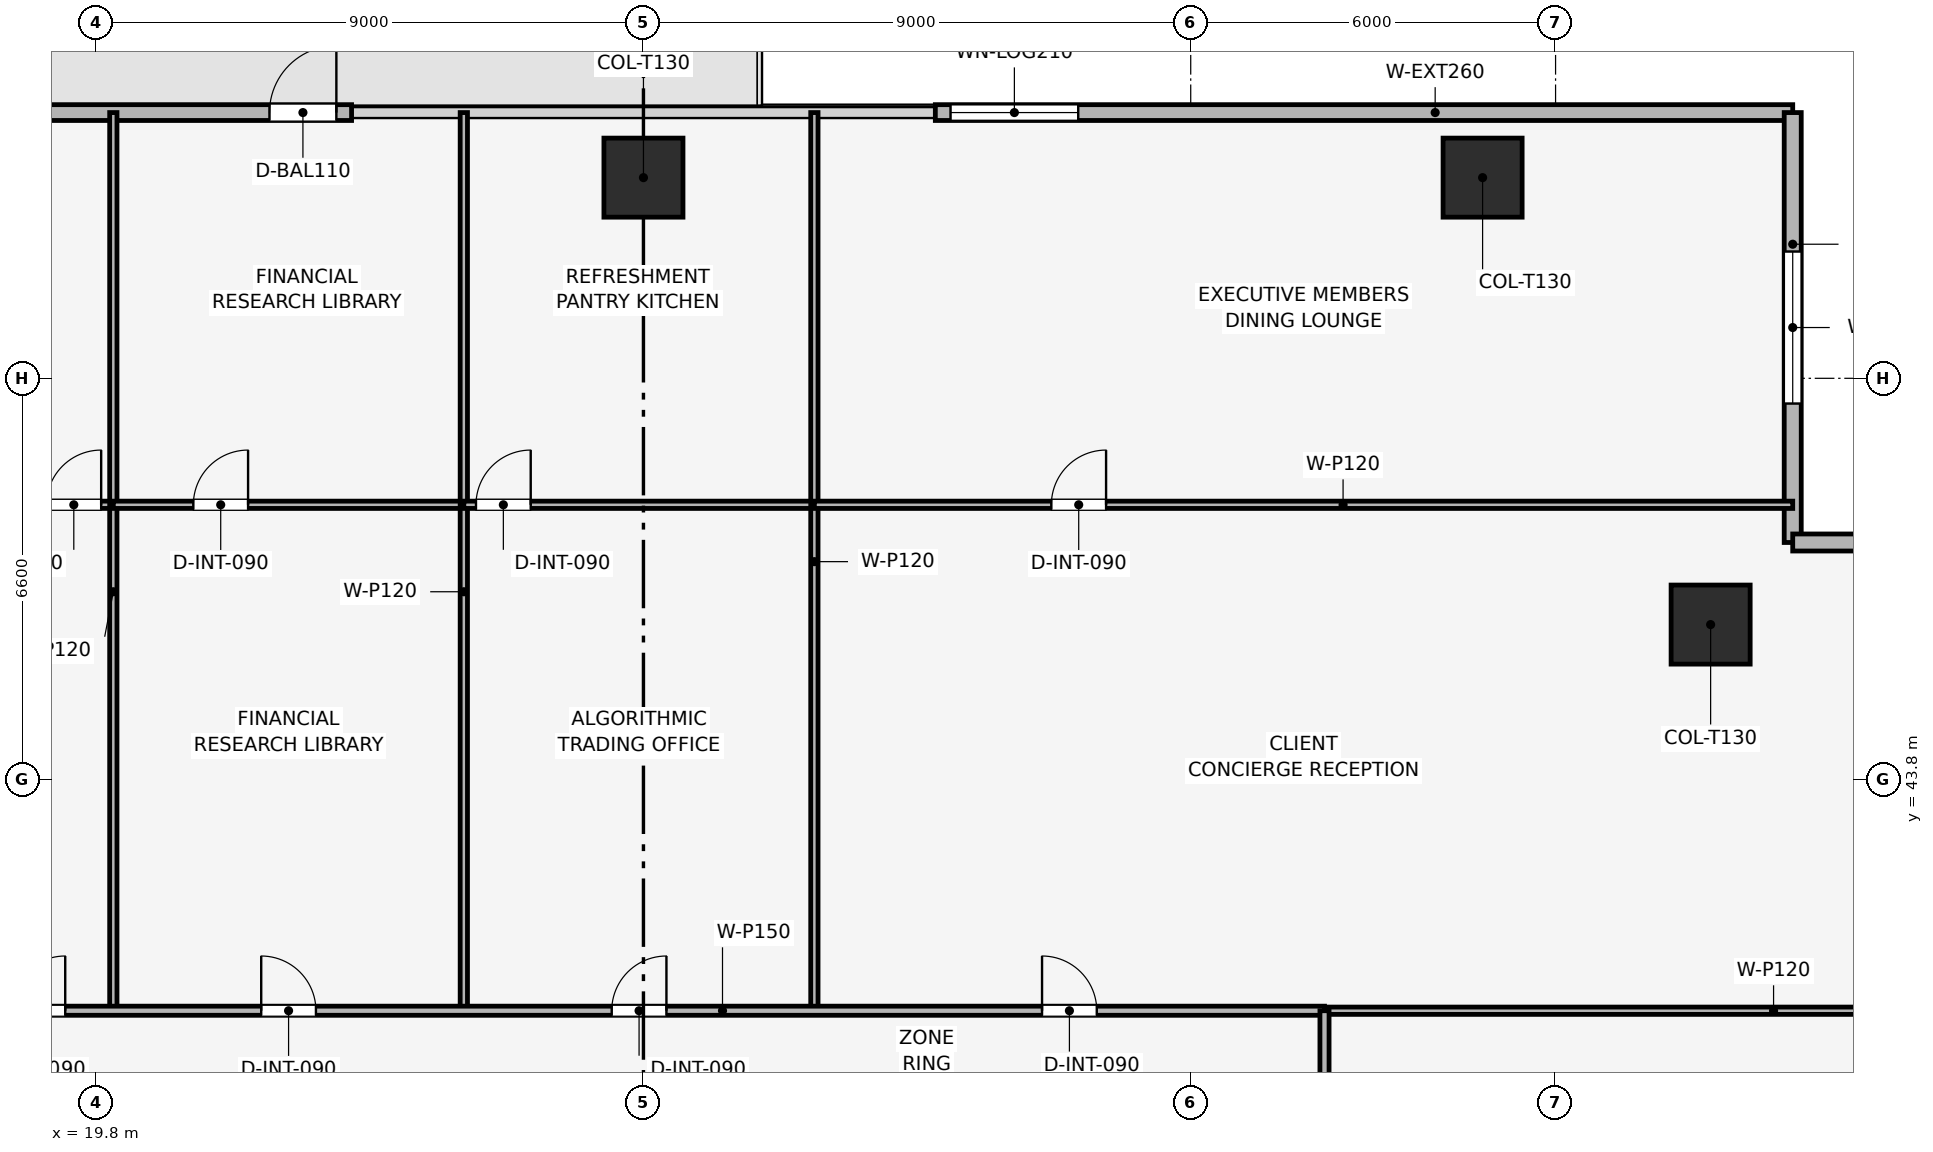
"""IFC4 building model, lengths in metres.
Left out: names, types, materials, properties, quantities, classifications, styles, units other than length and angle.
Written with IfcOpenShell. Run it as: python <this file> out.ifc"""

import sys

from ifc_helpers import new_model, si_unit, direction, frame, frame_2d, origin, origin_2d, place, context, subcontext, project, spatial, rectangle, extrude, element, fill, save


model = new_model("IFC4")
c1 = context("Model", 3, precision=1e-05, world=origin(), true_north=direction((0.0, 1.0)))
c2 = subcontext(c1, "Body", "Model", "MODEL_VIEW")
j1 = project(units=[si_unit("LENGTHUNIT", "METRE"), si_unit("PLANEANGLEUNIT", "RADIAN")], contexts=[c1])
p1 = place(None, origin())
s1 = spatial("IfcSite", under=j1, at=p1, CompositionType="ELEMENT")
p2 = place(p1, origin())
s2 = spatial("IfcBuilding", under=s1, at=p2, CompositionType="ELEMENT")
p3 = place(p2, frame((0.0, 0.0, 129.0)))
s3 = spatial("IfcBuildingStorey", under=s2, at=p3, CompositionType="ELEMENT", Elevation=129.0)
for number, where, z_axis, x_axis in (
    (1, (42.6, 53.7, 0.003), (0.0, 0.0, 1.0), (1.0, 0.0, 0.0)),
    (2, (28.8, 53.7, 0.003), (0.0, 0.0, 1.0), (1.0, 0.0, 0.0)),
    (3, (46.35, 46.35, 0.003), (0.0, 0.0, 1.0), (1.0, 0.0, 0.0)),
):
    element("IfcColumn", number, at=place(p3, frame(where, z_axis=z_axis, x_axis=x_axis)), inside=s3, PredefinedType="COLUMN", context=c2, shape_type="SweptSolid", body=[
        extrude(rectangle(XDim=1.3, YDim=1.3, at=origin_2d()), origin(), (0.0, 0.0, 1.0), 3.644),
    ])
p4 = place(p3, frame((9.9, 54.77, 0.0), z_axis=(0.0, 0.0, 1.0), x_axis=(1.0, 0.0, 0.0)))
e4 = element("IfcWall", 4, at=p4, inside=s3, PredefinedType="SOLIDWALL", context=c2, shape_type="SweptSolid", body=[
    extrude(rectangle(XDim=14.1, YDim=0.26, at=frame_2d((7.05, 0.0))), origin(), (0.0, 0.0, 1.0), 3.65),
])
p5 = place(p4, frame((12.75, 0.0, 0.0)))
e5 = element("IfcOpeningElement", 5, at=p5, cuts=e4, PredefinedType="OPENING", context=c2, shape_type="SweptSolid", body=[
    extrude(rectangle(XDim=1.1, YDim=2.2, at=frame_2d((0.55, 1.1))), frame((0.0, 0.14, 0.0), z_axis=(0.0, -1.0, 0.0), x_axis=(1.0, 0.0, 0.0)), (0.0, 0.0, 1.0), 0.28),
])
p6 = place(p3, frame((33.6, 54.77, 0.0), z_axis=(0.0, 0.0, 1.0), x_axis=(1.0, 0.0, 0.0)))
e6 = element("IfcWall", 6, at=p6, inside=s3, PredefinedType="SOLIDWALL", context=c2, shape_type="SweptSolid", body=[
    extrude(rectangle(XDim=14.1, YDim=0.26, at=frame_2d((7.05, 0.0))), origin(), (0.0, 0.0, 1.0), 3.65),
])
p7 = place(p6, frame((0.25, 0.0, 0.72)))
e7 = element("IfcOpeningElement", 7, at=p7, cuts=e6, PredefinedType="OPENING", context=c2, shape_type="SweptSolid", body=[
    extrude(rectangle(XDim=2.1, YDim=2.1, at=frame_2d((1.05, 1.05))), frame((0.0, 0.14, 0.0), z_axis=(0.0, -1.0, 0.0), x_axis=(1.0, 0.0, 0.0)), (0.0, 0.0, 1.0), 0.28),
])
p8 = place(p3, frame((47.7, 54.77, 0.0), z_axis=(0.0, 0.0, 1.0), x_axis=(0.0, -1.0, 0.0)))
e8 = element("IfcWall", 8, at=p8, inside=s3, PredefinedType="SOLIDWALL", context=c2, shape_type="SweptSolid", body=[
    extrude(rectangle(XDim=7.07, YDim=0.28, at=frame_2d((3.535, 0.0))), origin(), (0.0, 0.0, 1.0), 3.65),
])
p9 = place(p8, frame((2.285, 0.0, 0.72)))
e9 = element("IfcOpeningElement", 9, at=p9, cuts=e8, PredefinedType="OPENING", context=c2, shape_type="SweptSolid", body=[
    extrude(rectangle(XDim=2.5, YDim=1.9, at=frame_2d((1.25, 0.95))), frame((0.0, 0.15, 0.0), z_axis=(0.0, -1.0, 0.0), x_axis=(1.0, 0.0, 0.0)), (0.0, 0.0, 1.0), 0.3),
])
p10 = place(p3, frame((47.7, 47.7, 0.0), z_axis=(0.0, 0.0, 1.0), x_axis=(1.0, 0.0, 0.0)))
e10 = element("IfcWall", 10, at=p10, inside=s3, PredefinedType="SOLIDWALL", context=c2, shape_type="SweptSolid", body=[
    extrude(rectangle(XDim=7.07, YDim=0.28, at=frame_2d((3.535, 0.0))), origin(), (0.0, 0.0, 1.0), 3.65),
])
p11 = place(p10, frame((2.285, 0.0, 0.72)))
e11 = element("IfcOpeningElement", 11, at=p11, cuts=e10, PredefinedType="OPENING", context=c2, shape_type="SweptSolid", body=[
    extrude(rectangle(XDim=2.5, YDim=1.9, at=frame_2d((1.25, 0.95))), frame((0.0, 0.15, 0.0), z_axis=(0.0, -1.0, 0.0), x_axis=(1.0, 0.0, 0.0)), (0.0, 0.0, 1.0), 0.3),
])
p12 = place(p3, frame((9.9, 48.32, 0.0), z_axis=(0.0, 0.0, 1.0), x_axis=(1.0, 0.0, 0.0)))
e12 = element("IfcWall", 12, at=p12, inside=s3, PredefinedType="PARTITIONING", context=c2, shape_type="SweptSolid", body=[
    extrude(rectangle(XDim=10.182, YDim=0.12, at=frame_2d((5.091, 0.0))), origin(), (0.0, 0.0, 1.0), 2.835),
])
p13 = place(p12, frame((9.082, 0.0, 0.0)))
e13 = element("IfcOpeningElement", 13, at=p13, cuts=e12, PredefinedType="OPENING", context=c2, shape_type="SweptSolid", body=[
    extrude(rectangle(XDim=0.9, YDim=2.1, at=frame_2d((0.45, 1.05))), frame((0.0, 0.07, 0.0), z_axis=(0.0, -1.0, 0.0), x_axis=(1.0, 0.0, 0.0)), (0.0, 0.0, 1.0), 0.14),
])
p14 = place(p3, frame((20.082, 40.0, 0.0), z_axis=(0.0, 0.0, 1.0), x_axis=(0.0, 1.0, 0.0)))
e14 = element("IfcWall", 14, at=p14, inside=s3, PredefinedType="PARTITIONING", context=c2, shape_type="SweptSolid", body=[
    extrude(rectangle(XDim=14.77, YDim=0.12, at=frame_2d((7.385, 0.0))), origin(), (0.0, 0.0, 1.0), 2.835),
])
p15 = place(p3, frame((20.082, 48.32, 0.0), z_axis=(0.0, 0.0, 1.0), x_axis=(1.0, 0.0, 0.0)))
e15 = element("IfcWall", 15, at=p15, inside=s3, PredefinedType="PARTITIONING", context=c2, shape_type="SweptSolid", body=[
    extrude(rectangle(XDim=5.764, YDim=0.12, at=frame_2d((2.882, 0.0))), origin(), (0.0, 0.0, 1.0), 3.185),
])
p16 = place(p15, frame((1.316, 0.0, 0.0)))
e16 = element("IfcOpeningElement", 16, at=p16, cuts=e15, PredefinedType="OPENING", context=c2, shape_type="SweptSolid", body=[
    extrude(rectangle(XDim=0.9, YDim=2.1, at=frame_2d((0.45, 1.05))), frame((0.0, 0.07, 0.0), z_axis=(0.0, -1.0, 0.0), x_axis=(1.0, 0.0, 0.0)), (0.0, 0.0, 1.0), 0.14),
])
p17 = place(p3, frame((25.846, 40.0, 0.0), z_axis=(0.0, 0.0, 1.0), x_axis=(0.0, 1.0, 0.0)))
e17 = element("IfcWall", 17, at=p17, inside=s3, PredefinedType="PARTITIONING", context=c2, shape_type="SweptSolid", body=[
    extrude(rectangle(XDim=14.77, YDim=0.12, at=frame_2d((7.385, 0.0))), origin(), (0.0, 0.0, 1.0), 2.835),
])
p18 = place(p3, frame((25.846, 48.32, 0.0), z_axis=(0.0, 0.0, 1.0), x_axis=(1.0, 0.0, 0.0)))
e18 = element("IfcWall", 18, at=p18, inside=s3, PredefinedType="PARTITIONING", context=c2, shape_type="SweptSolid", body=[
    extrude(rectangle(XDim=5.765, YDim=0.12, at=frame_2d((2.883, 0.0))), origin(), (0.0, 0.0, 1.0), 3.185),
])
p19 = place(p18, frame((0.2, 0.0, 0.0)))
e19 = element("IfcOpeningElement", 19, at=p19, cuts=e18, PredefinedType="OPENING", context=c2, shape_type="SweptSolid", body=[
    extrude(rectangle(XDim=0.9, YDim=2.1, at=frame_2d((0.45, 1.05))), frame((0.0, 0.07, 0.0), z_axis=(0.0, -1.0, 0.0), x_axis=(1.0, 0.0, 0.0)), (0.0, 0.0, 1.0), 0.14),
])
p20 = place(p3, frame((31.611, 40.0, 0.0), z_axis=(0.0, 0.0, 1.0), x_axis=(0.0, 1.0, 0.0)))
e20 = element("IfcWall", 20, at=p20, inside=s3, PredefinedType="PARTITIONING", context=c2, shape_type="SweptSolid", body=[
    extrude(rectangle(XDim=14.77, YDim=0.12, at=frame_2d((7.385, 0.0))), origin(), (0.0, 0.0, 1.0), 2.835),
])
p21 = place(p3, frame((31.611, 48.32, 0.0), z_axis=(0.0, 0.0, 1.0), x_axis=(1.0, 0.0, 0.0)))
e21 = element("IfcWall", 21, at=p21, inside=s3, PredefinedType="PARTITIONING", context=c2, shape_type="SweptSolid", body=[
    extrude(rectangle(XDim=16.089, YDim=0.12, at=frame_2d((8.044, 0.0))), origin(), (0.0, 0.0, 1.0), 2.835),
])
p22 = place(p21, frame((3.897, 0.0, 0.0)))
e22 = element("IfcOpeningElement", 22, at=p22, cuts=e21, PredefinedType="OPENING", context=c2, shape_type="SweptSolid", body=[
    extrude(rectangle(XDim=0.9, YDim=2.1, at=frame_2d((0.45, 1.05))), frame((0.0, 0.07, 0.0), z_axis=(0.0, -1.0, 0.0), x_axis=(1.0, 0.0, 0.0)), (0.0, 0.0, 1.0), 0.14),
])
p23 = place(p3, frame((40.0, 40.0, 0.0), z_axis=(0.0, 0.0, 1.0), x_axis=(1.0, 0.0, 0.0)))
e23 = element("IfcWall", 23, at=p23, inside=s3, PredefinedType="PARTITIONING", context=c2, shape_type="SweptSolid", body=[
    extrude(rectangle(XDim=14.77, YDim=0.12, at=frame_2d((7.385, 0.0))), origin(), (0.0, 0.0, 1.0), 2.835),
])
p24 = place(p3, frame((17.6, 40.0, 0.0), z_axis=(0.0, 0.0, 1.0), x_axis=(1.0, 0.0, 0.0)))
e24 = element("IfcWall", 24, at=p24, inside=s3, PredefinedType="PARTITIONING", context=c2, shape_type="SweptSolid", body=[
    extrude(rectangle(XDim=22.4, YDim=0.15, at=frame_2d((11.2, 0.0))), origin(), (0.0, 0.0, 1.0), 3.185),
])
p25 = place(p24, frame((0.791, 0.0, 0.0)))
e25 = element("IfcOpeningElement", 25, at=p25, cuts=e24, PredefinedType="OPENING", context=c2, shape_type="SweptSolid", body=[
    extrude(rectangle(XDim=0.9, YDim=2.1, at=frame_2d((0.45, 1.05))), frame((0.0, 0.085, 0.0), z_axis=(0.0, -1.0, 0.0), x_axis=(1.0, 0.0, 0.0)), (0.0, 0.0, 1.0), 0.17),
])
p26 = place(p24, frame((4.914, 0.0, 0.0)))
e26 = element("IfcOpeningElement", 26, at=p26, cuts=e24, PredefinedType="OPENING", context=c2, shape_type="SweptSolid", body=[
    extrude(rectangle(XDim=0.9, YDim=2.1, at=frame_2d((0.45, 1.05))), frame((0.0, 0.085, 0.0), z_axis=(0.0, -1.0, 0.0), x_axis=(1.0, 0.0, 0.0)), (0.0, 0.0, 1.0), 0.17),
])
p27 = place(p24, frame((10.678, 0.0, 0.0)))
e27 = element("IfcOpeningElement", 27, at=p27, cuts=e24, PredefinedType="OPENING", context=c2, shape_type="SweptSolid", body=[
    extrude(rectangle(XDim=0.9, YDim=2.1, at=frame_2d((0.45, 1.05))), frame((0.0, 0.085, 0.0), z_axis=(0.0, -1.0, 0.0), x_axis=(1.0, 0.0, 0.0)), (0.0, 0.0, 1.0), 0.17),
])
p28 = place(p24, frame((17.755, 0.0, 0.0)))
e28 = element("IfcOpeningElement", 28, at=p28, cuts=e24, PredefinedType="OPENING", context=c2, shape_type="SweptSolid", body=[
    extrude(rectangle(XDim=0.9, YDim=2.1, at=frame_2d((0.45, 1.05))), frame((0.0, 0.085, 0.0), z_axis=(0.0, -1.0, 0.0), x_axis=(1.0, 0.0, 0.0)), (0.0, 0.0, 1.0), 0.17),
])
p29 = place(p3, frame((40.0, 17.6, 0.0), z_axis=(0.0, 0.0, 1.0), x_axis=(0.0, 1.0, 0.0)))
e29 = element("IfcWall", 29, at=p29, inside=s3, PredefinedType="PARTITIONING", context=c2, shape_type="SweptSolid", body=[
    extrude(rectangle(XDim=22.4, YDim=0.15, at=frame_2d((11.2, 0.0))), origin(), (0.0, 0.0, 1.0), 3.185),
])
p30 = place(p29, frame((1.95, 0.0, 0.0)))
e30 = element("IfcOpeningElement", 30, at=p30, cuts=e29, PredefinedType="OPENING", context=c2, shape_type="SweptSolid", body=[
    extrude(rectangle(XDim=0.9, YDim=2.1, at=frame_2d((0.45, 1.05))), frame((0.0, 0.085, 0.0), z_axis=(0.0, -1.0, 0.0), x_axis=(1.0, 0.0, 0.0)), (0.0, 0.0, 1.0), 0.17),
])
p31 = place(p29, frame((5.75, 0.0, 0.0)))
e31 = element("IfcOpeningElement", 31, at=p31, cuts=e29, PredefinedType="OPENING", context=c2, shape_type="SweptSolid", body=[
    extrude(rectangle(XDim=0.9, YDim=2.1, at=frame_2d((0.45, 1.05))), frame((0.0, 0.085, 0.0), z_axis=(0.0, -1.0, 0.0), x_axis=(1.0, 0.0, 0.0)), (0.0, 0.0, 1.0), 0.17),
])
p32 = place(p29, frame((8.65, 0.0, 0.0)))
e32 = element("IfcOpeningElement", 32, at=p32, cuts=e29, PredefinedType="OPENING", context=c2, shape_type="SweptSolid", body=[
    extrude(rectangle(XDim=0.9, YDim=2.1, at=frame_2d((0.45, 1.05))), frame((0.0, 0.085, 0.0), z_axis=(0.0, -1.0, 0.0), x_axis=(1.0, 0.0, 0.0)), (0.0, 0.0, 1.0), 0.17),
])
p33 = place(p29, frame((11.4, 0.0, 0.0)))
e33 = element("IfcOpeningElement", 33, at=p33, cuts=e29, PredefinedType="OPENING", context=c2, shape_type="SweptSolid", body=[
    extrude(rectangle(XDim=0.95, YDim=2.1, at=frame_2d((0.475, 1.05))), frame((0.0, 0.085, 0.0), z_axis=(0.0, -1.0, 0.0), x_axis=(1.0, 0.0, 0.0)), (0.0, 0.0, 1.0), 0.17),
])
p34 = place(p29, frame((17.35, 0.0, 0.0)))
e34 = element("IfcOpeningElement", 34, at=p34, cuts=e29, PredefinedType="OPENING", context=c2, shape_type="SweptSolid", body=[
    extrude(rectangle(XDim=0.9, YDim=2.1, at=frame_2d((0.45, 1.05))), frame((0.0, 0.085, 0.0), z_axis=(0.0, -1.0, 0.0), x_axis=(1.0, 0.0, 0.0)), (0.0, 0.0, 1.0), 0.17),
])
p35 = place(p5, origin())
e35 = element("IfcDoor", 35, at=p35, inside=s3, OperationType="SINGLE_SWING_RIGHT", PredefinedType="DOOR", context=c2, shape_type="SweptSolid", body=[
    extrude(rectangle(XDim=1.1, YDim=2.2, at=frame_2d((0.55, 1.1))), frame((0.0, 0.025, 0.0), z_axis=(0.0, -1.0, 0.0), x_axis=(1.0, 0.0, 0.0)), (0.0, 0.0, 1.0), 0.05),
])
fill(e5, e35)
p36 = place(p7, origin())
e36 = element("IfcWindow", 36, at=p36, inside=s3, PartitioningType="SINGLE_PANEL", PredefinedType="WINDOW", context=c2, shape_type="SweptSolid", body=[
    extrude(rectangle(XDim=2.1, YDim=2.1, at=frame_2d((1.05, 1.05))), frame((0.0, 0.03, 0.0), z_axis=(0.0, -1.0, 0.0), x_axis=(1.0, 0.0, 0.0)), (0.0, 0.0, 1.0), 0.06),
])
fill(e7, e36)
p37 = place(p9, origin())
e37 = element("IfcWindow", 37, at=p37, inside=s3, PartitioningType="SINGLE_PANEL", PredefinedType="WINDOW", context=c2, shape_type="SweptSolid", body=[
    extrude(rectangle(XDim=2.5, YDim=1.9, at=frame_2d((1.25, 0.95))), frame((0.0, 0.03, 0.0), z_axis=(0.0, -1.0, 0.0), x_axis=(1.0, 0.0, 0.0)), (0.0, 0.0, 1.0), 0.06),
])
fill(e9, e37)
p38 = place(p13, origin())
e38 = element("IfcDoor", 38, at=p38, inside=s3, OperationType="SINGLE_SWING_RIGHT", PredefinedType="DOOR", context=c2, shape_type="SweptSolid", body=[
    extrude(rectangle(XDim=0.9, YDim=2.1, at=frame_2d((0.45, 1.05))), frame((0.0, 0.025, 0.0), z_axis=(0.0, -1.0, 0.0), x_axis=(1.0, 0.0, 0.0)), (0.0, 0.0, 1.0), 0.05),
])
fill(e13, e38)
p39 = place(p16, origin())
e39 = element("IfcDoor", 39, at=p39, inside=s3, OperationType="SINGLE_SWING_RIGHT", PredefinedType="DOOR", context=c2, shape_type="SweptSolid", body=[
    extrude(rectangle(XDim=0.9, YDim=2.1, at=frame_2d((0.45, 1.05))), frame((0.0, 0.025, 0.0), z_axis=(0.0, -1.0, 0.0), x_axis=(1.0, 0.0, 0.0)), (0.0, 0.0, 1.0), 0.05),
])
fill(e16, e39)
p40 = place(p19, origin())
e40 = element("IfcDoor", 40, at=p40, inside=s3, OperationType="SINGLE_SWING_RIGHT", PredefinedType="DOOR", context=c2, shape_type="SweptSolid", body=[
    extrude(rectangle(XDim=0.9, YDim=2.1, at=frame_2d((0.45, 1.05))), frame((0.0, 0.025, 0.0), z_axis=(0.0, -1.0, 0.0), x_axis=(1.0, 0.0, 0.0)), (0.0, 0.0, 1.0), 0.05),
])
fill(e19, e40)
p41 = place(p22, origin())
e41 = element("IfcDoor", 41, at=p41, inside=s3, OperationType="SINGLE_SWING_RIGHT", PredefinedType="DOOR", context=c2, shape_type="SweptSolid", body=[
    extrude(rectangle(XDim=0.9, YDim=2.1, at=frame_2d((0.45, 1.05))), frame((0.0, 0.025, 0.0), z_axis=(0.0, -1.0, 0.0), x_axis=(1.0, 0.0, 0.0)), (0.0, 0.0, 1.0), 0.05),
])
fill(e22, e41)
p42 = place(p25, origin())
e42 = element("IfcDoor", 42, at=p42, inside=s3, OperationType="SINGLE_SWING_RIGHT", PredefinedType="DOOR", context=c2, shape_type="SweptSolid", body=[
    extrude(rectangle(XDim=0.9, YDim=2.1, at=frame_2d((0.45, 1.05))), frame((0.0, 0.025, 0.0), z_axis=(0.0, -1.0, 0.0), x_axis=(1.0, 0.0, 0.0)), (0.0, 0.0, 1.0), 0.05),
])
fill(e25, e42)
p43 = place(p26, origin())
e43 = element("IfcDoor", 43, at=p43, inside=s3, OperationType="SINGLE_SWING_LEFT", PredefinedType="DOOR", context=c2, shape_type="SweptSolid", body=[
    extrude(rectangle(XDim=0.9, YDim=2.1, at=frame_2d((0.45, 1.05))), frame((0.0, 0.025, 0.0), z_axis=(0.0, -1.0, 0.0), x_axis=(1.0, 0.0, 0.0)), (0.0, 0.0, 1.0), 0.05),
])
fill(e26, e43)
p44 = place(p27, origin())
e44 = element("IfcDoor", 44, at=p44, inside=s3, OperationType="SINGLE_SWING_RIGHT", PredefinedType="DOOR", context=c2, shape_type="SweptSolid", body=[
    extrude(rectangle(XDim=0.9, YDim=2.1, at=frame_2d((0.45, 1.05))), frame((0.0, 0.025, 0.0), z_axis=(0.0, -1.0, 0.0), x_axis=(1.0, 0.0, 0.0)), (0.0, 0.0, 1.0), 0.05),
])
fill(e27, e44)
p45 = place(p28, origin())
e45 = element("IfcDoor", 45, at=p45, inside=s3, OperationType="SINGLE_SWING_LEFT", PredefinedType="DOOR", context=c2, shape_type="SweptSolid", body=[
    extrude(rectangle(XDim=0.9, YDim=2.1, at=frame_2d((0.45, 1.05))), frame((0.0, 0.025, 0.0), z_axis=(0.0, -1.0, 0.0), x_axis=(1.0, 0.0, 0.0)), (0.0, 0.0, 1.0), 0.05),
])
fill(e28, e45)
save(model, sys.argv[1])
